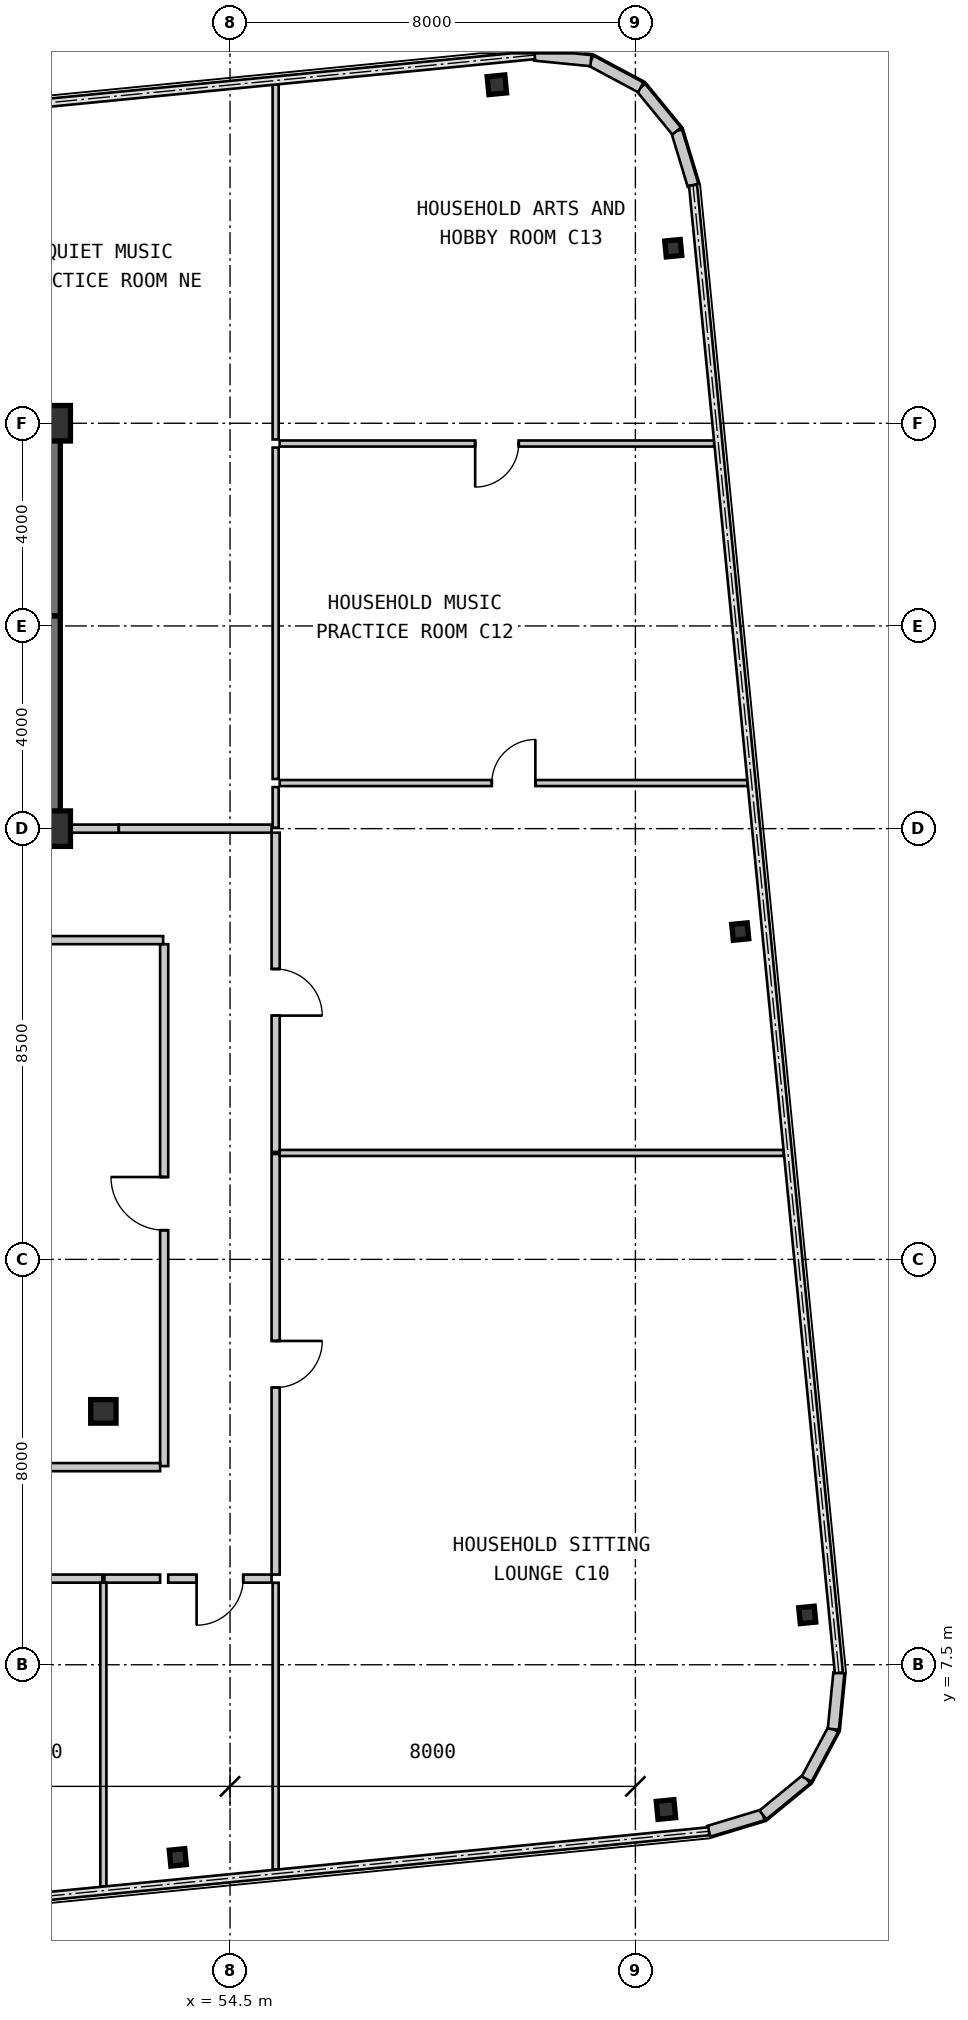
"""IFC4 building model, lengths in metres.
Left out: names, types, materials, properties, quantities, classifications, styles, units other than length and angle.
Written with IfcOpenShell. Run it as: python <this file> out.ifc"""

import sys

from ifc_helpers import new_model, si_unit, direction, frame, frame_2d, origin, origin_2d, place, context, subcontext, project, spatial, rectangle, i_section, extrude, source, transform, mapped, element, fill, save


model = new_model("IFC4")
c1 = context("Model", 3, precision=1e-05, world=origin(), true_north=direction((0.0, 1.0)))
c2 = subcontext(c1, "Body", "Model", "MODEL_VIEW")
j1 = project(units=[si_unit("LENGTHUNIT", "METRE"), si_unit("PLANEANGLEUNIT", "RADIAN")], contexts=[c1])
p1 = place(None, origin())
s1 = spatial("IfcSite", under=j1, at=p1, CompositionType="ELEMENT")
p2 = place(p1, origin())
s2 = spatial("IfcBuilding", under=s1, at=p2, CompositionType="ELEMENT")
p3 = place(p2, frame((0.0, 0.0, 93.45)))
s3 = spatial("IfcBuildingStorey", under=s2, at=p3, CompositionType="ELEMENT", Elevation=93.45)
m1 = source(origin(), c2, "Body", "SweptSolid", [
    extrude(rectangle(XDim=0.7, YDim=0.7, at=origin_2d()), origin(), (0.0, 0.0, 1.0), 3.15),
])
for number, where, z_axis, x_axis in (
    (1, (51.0, 24.0, 0.0), (0.0, 0.0, 1.0), (1.0, 0.0, 0.0)),
    (2, (51.0, 32.0, 0.0), (0.0, 0.0, 1.0), (1.0, 0.0, 0.0)),
):
    element("IfcColumn", number, at=place(p3, frame(where, z_axis=z_axis, x_axis=x_axis)), inside=s3, PredefinedType="COLUMN", context=c2, shape_type="MappedRepresentation", body=[
        mapped(m1, transform((0.0, 0.0, 0.0), scale=1.0)),
    ])
m2 = source(origin(), c2, "Body", "SweptSolid", [
    extrude(i_section(OverallWidth=0.5, OverallDepth=0.464, WebThickness=0.022, FlangeThickness=0.034, at=origin_2d()), origin(), (0.0, 0.0, 1.0), 3.15),
])
p4 = place(p3, frame((52.0, 12.5, 0.0), z_axis=(0.0, 0.0, 1.0), x_axis=(1.0, 0.0, 0.0)))
e3 = element("IfcColumn", 3, at=p4, inside=s3, PredefinedType="COLUMN", context=c2, shape_type="MappedRepresentation", body=[
    mapped(m2, transform((0.0, 0.0, 0.0), scale=1.0)),
])
m3 = source(origin(), c2, "Body", "SweptSolid", [
    extrude(i_section(OverallWidth=0.307, OverallDepth=0.315, WebThickness=0.012, FlangeThickness=0.019, at=origin_2d()), origin(), (0.0, 0.0, 1.0), 3.15),
])
p5 = place(p3, frame((53.469, 3.698, 0.0), z_axis=(0.0, 0.0, 1.0), x_axis=(0.995227399982, 0.097582899759, 0.0)))
e4 = element("IfcColumn", 4, at=p5, inside=s3, PredefinedType="COLUMN", context=c2, shape_type="MappedRepresentation", body=[
    mapped(m3, transform((0.0, 0.0, 0.0), scale=1.0)),
])
m4 = source(origin(), c2, "Body", "SweptSolid", [
    extrude(i_section(OverallWidth=0.35, OverallDepth=0.356, WebThickness=0.018, FlangeThickness=0.028, at=origin_2d()), origin(), (0.0, 0.0, 1.0), 3.15),
])
for number, where, z_axis, x_axis in (
    (5, (63.103, 4.643, 0.0), (0.0, 0.0, 1.0), (0.995, 0.098, 0.0)),
    (6, (59.766, 38.68, 0.0), (0.0, 0.0, 1.0), (0.995, 0.098, 0.0)),
):
    element("IfcColumn", number, at=place(p3, frame(where, z_axis=z_axis, x_axis=x_axis)), inside=s3, PredefinedType="COLUMN", context=c2, shape_type="MappedRepresentation", body=[
        mapped(m4, transform((0.0, 0.0, 0.0), scale=1.0)),
    ])
for number, where, z_axis, x_axis in (
    (7, (65.892, 8.484, 0.0), (0.0, 0.0, 1.0), (0.995, 0.098, 0.0)),
    (8, (64.57, 21.969, 0.0), (0.0, 0.0, 1.0), (0.995, 0.098, 0.0)),
    (9, (63.247, 35.454, 0.0), (0.0, 0.0, 1.0), (0.995, 0.098, 0.0)),
):
    element("IfcColumn", number, at=place(p3, frame(where, z_axis=z_axis, x_axis=x_axis)), inside=s3, PredefinedType="COLUMN", context=c2, shape_type="MappedRepresentation", body=[
        mapped(m3, transform((0.0, 0.0, 0.0), scale=1.0)),
    ])
m5 = source(origin(), c2, "Body", "SweptSolid", [
    extrude(rectangle(XDim=1.116, YDim=0.22, at=frame_2d((0.558, 0.0))), origin(), (0.0, 0.0, 1.0), 2.93),
])
p6 = place(p3, frame((63.949, 4.214, 0.0), z_axis=(0.0, 0.0, 1.0), x_axis=(0.957052003726, 0.289916301997, 0.0)))
e10 = element("IfcWall", 10, at=p6, inside=s3, PredefinedType="SOLIDWALL", context=c2, shape_type="MappedRepresentation", body=[
    mapped(m5, transform((0.0, 0.0, 0.0), scale=1.0)),
])
m6 = source(origin(), c2, "Body", "SweptSolid", [
    extrude(rectangle(XDim=1.116, YDim=0.22, at=frame_2d((0.558, 0.0))), origin(), (0.0, 0.0, 1.0), 2.93),
])
p7 = place(p3, frame((65.017, 4.537, 0.0), z_axis=(0.0, 0.0, 1.0), x_axis=(0.773342870285, 0.633988016432, 0.0)))
e11 = element("IfcWall", 11, at=p7, inside=s3, PredefinedType="SOLIDWALL", context=c2, shape_type="MappedRepresentation", body=[
    mapped(m6, transform((0.0, 0.0, 0.0), scale=1.0)),
])
p8 = place(p3, frame((65.88, 5.245, 0.0), z_axis=(0.0, 0.0, 1.0), x_axis=(0.471723463201, 0.881746547635, 0.0)))
e12 = element("IfcWall", 12, at=p8, inside=s3, PredefinedType="SOLIDWALL", context=c2, shape_type="MappedRepresentation", body=[
    mapped(m5, transform((0.0, 0.0, 0.0), scale=1.0)),
])
for number, where, z_axis, x_axis in (
    (13, (66.406, 6.229, 0.0), (0.0, 0.0, 1.0), (0.098, 0.995, 0.0)),
    (14, (63.638, 36.698, 0.0), (0.0, 0.0, 1.0), (-0.29, 0.957, 0.0)),
):
    element("IfcWall", number, at=place(p3, frame(where, z_axis=z_axis, x_axis=x_axis)), inside=s3, PredefinedType="SOLIDWALL", context=c2, shape_type="MappedRepresentation", body=[
        mapped(m6, transform((0.0, 0.0, 0.0), scale=1.0)),
    ])
p9 = place(p3, frame((63.314, 37.766, 0.0), z_axis=(0.0, 0.0, 1.0), x_axis=(-0.634095287989, 0.773254916409, 0.0)))
e15 = element("IfcWall", 15, at=p9, inside=s3, PredefinedType="SOLIDWALL", context=c2, shape_type="MappedRepresentation", body=[
    mapped(m5, transform((0.0, 0.0, 0.0), scale=1.0)),
])
for number, where, z_axis, x_axis in (
    (16, (62.607, 38.629, 0.0), (0.0, 0.0, 1.0), (-0.882, 0.472, 0.0)),
    (17, (61.623, 39.156, 0.0), (0.0, 0.0, 1.0), (-0.995, 0.098, 0.0)),
):
    element("IfcWall", number, at=place(p3, frame(where, z_axis=z_axis, x_axis=x_axis)), inside=s3, PredefinedType="SOLIDWALL", context=c2, shape_type="MappedRepresentation", body=[
        mapped(m6, transform((0.0, 0.0, 0.0), scale=1.0)),
    ])
m7 = source(origin(), c2, "Body", "SweptSolid", [
    extrude(rectangle(XDim=11.95, YDim=0.3, at=frame_2d((5.975, 0.0))), origin(), (0.0, 0.0, 1.0), 2.93),
])
p10 = place(p3, frame((39.2, 32.0, 0.0), z_axis=(0.0, 0.0, 1.0), x_axis=(1.0, 0.0, 0.0)))
e18 = element("IfcWall", 18, at=p10, inside=s3, PredefinedType="SHEAR", context=c2, shape_type="MappedRepresentation", body=[
    mapped(m7, transform((0.0, 0.0, 0.0), scale=1.0)),
])
m8 = source(origin(), c2, "Body", "SweptSolid", [
    extrude(rectangle(XDim=4.05, YDim=0.3, at=frame_2d((2.025, 0.0))), origin(), (0.0, 0.0, 1.0), 2.93),
])
p11 = place(p3, frame((51.0, 24.15, 0.0), z_axis=(0.0, 0.0, 1.0), x_axis=(0.0, 1.0, 0.0)))
e19 = element("IfcWall", 19, at=p11, inside=s3, PredefinedType="SHEAR", context=c2, shape_type="MappedRepresentation", body=[
    mapped(m8, transform((0.0, 0.0, 0.0), scale=1.0)),
])
m9 = source(origin(), c2, "Body", "SweptSolid", [
    extrude(rectangle(XDim=3.65, YDim=0.3, at=frame_2d((1.825, 0.0))), origin(), (0.0, 0.0, 1.0), 2.93),
])
p12 = place(p3, frame((51.0, 28.2, 0.0), z_axis=(0.0, 0.0, 1.0), x_axis=(0.0, 1.0, 0.0)))
e20 = element("IfcWall", 20, at=p12, inside=s3, PredefinedType="SHEAR", context=c2, shape_type="MappedRepresentation", body=[
    mapped(m9, transform((0.0, 0.0, 0.0), scale=1.0)),
])
m10 = source(origin(), c2, "Body", "SweptSolid", [
    extrude(rectangle(XDim=4.9, YDim=0.3, at=frame_2d((2.45, 0.0))), origin(), (0.0, 0.0, 1.0), 2.93),
])
p13 = place(p3, frame((46.25, 24.0, 0.0), z_axis=(0.0, 0.0, 1.0), x_axis=(1.0, 0.0, 0.0)))
e21 = element("IfcWall", 21, at=p13, inside=s3, PredefinedType="SHEAR", context=c2, shape_type="MappedRepresentation", body=[
    mapped(m10, transform((0.0, 0.0, 0.0), scale=1.0)),
])
m11 = source(origin(), c2, "Body", "SweptSolid", [
    extrude(rectangle(XDim=10.3, YDim=0.16, at=frame_2d((5.15, 0.0))), origin(), (0.0, 0.0, 1.0), 2.93),
])
p14 = place(p3, frame((53.2, 11.42, 0.0), z_axis=(0.0, 0.0, 1.0), x_axis=(0.0, 1.0, 0.0)))
e22 = element("IfcWall", 22, at=p14, inside=s3, PredefinedType="PARTITIONING", context=c2, shape_type="MappedRepresentation", body=[
    mapped(m11, transform((0.0, 0.0, 0.0), scale=1.0)),
])
m12 = source(origin(), c2, "Body", "SweptSolid", [
    extrude(rectangle(XDim=1.05, YDim=2.1, at=frame_2d((0.525, 1.05))), frame((0.0, 0.09, 0.0), z_axis=(0.0, -1.0, 0.0), x_axis=(1.0, 0.0, 0.0)), (0.0, 0.0, 1.0), 0.18),
])
p15 = place(p14, frame((4.655, 0.0, 0.0)))
e23 = element("IfcOpeningElement", 23, at=p15, cuts=e22, PredefinedType="OPENING", context=c2, shape_type="MappedRepresentation", body=[
    mapped(m12, transform((0.0, 0.0, 0.0), scale=1.0)),
])
m13 = source(origin(), c2, "Body", "SweptSolid", [
    extrude(rectangle(XDim=7.359, YDim=0.16, at=frame_2d((3.68, 0.0))), origin(), (0.0, 0.0, 1.0), 2.93),
])
p16 = place(p3, frame((53.18, 21.8, 0.0), z_axis=(0.0, 0.0, 1.0), x_axis=(-1.0, 0.0, 0.0)))
e24 = element("IfcWall", 24, at=p16, inside=s3, PredefinedType="PARTITIONING", context=c2, shape_type="MappedRepresentation", body=[
    mapped(m13, transform((0.0, 0.0, 0.0), scale=1.0)),
])
m14 = source(origin(), c2, "Body", "SweptSolid", [
    extrude(rectangle(XDim=2.04, YDim=0.16, at=frame_2d((1.02, 0.0))), origin(), (0.0, 0.0, 1.0), 2.93),
])
p17 = place(p3, frame((55.32, 9.2, 0.0), z_axis=(0.0, 0.0, 1.0), x_axis=(-1.0, 0.0, 0.0)))
e25 = element("IfcWall", 25, at=p17, inside=s3, PredefinedType="PARTITIONING", context=c2, shape_type="MappedRepresentation", body=[
    mapped(m14, transform((0.0, 0.0, 0.0), scale=1.0)),
])
m15 = source(origin(), c2, "Body", "SweptSolid", [
    extrude(rectangle(XDim=0.92, YDim=2.1, at=frame_2d((0.46, 1.05))), frame((0.0, 0.09, 0.0), z_axis=(0.0, -1.0, 0.0), x_axis=(1.0, 0.0, 0.0)), (0.0, 0.0, 1.0), 0.18),
])
p18 = place(p17, frame((0.56, 0.0, 0.0)))
e26 = element("IfcOpeningElement", 26, at=p18, cuts=e25, PredefinedType="OPENING", context=c2, shape_type="MappedRepresentation", body=[
    mapped(m15, transform((0.0, 0.0, 0.0), scale=1.0)),
])
m16 = source(origin(), c2, "Body", "SweptSolid", [
    extrude(rectangle(XDim=8.3, YDim=0.16, at=frame_2d((4.15, 0.0))), origin(), (0.0, 0.0, 1.0), 2.93),
])
p19 = place(p3, frame((55.4, 17.58, 0.0), z_axis=(0.0, 0.0, 1.0), x_axis=(0.0, -1.0, 0.0)))
e27 = element("IfcWall", 27, at=p19, inside=s3, PredefinedType="PARTITIONING", context=c2, shape_type="MappedRepresentation", body=[
    mapped(m16, transform((0.0, 0.0, 0.0), scale=1.0)),
])
p20 = place(p19, frame((3.69, 0.0, 0.0)))
e28 = element("IfcOpeningElement", 28, at=p20, cuts=e27, PredefinedType="OPENING", context=c2, shape_type="MappedRepresentation", body=[
    mapped(m15, transform((0.0, 0.0, 0.0), scale=1.0)),
])
m17 = source(origin(), c2, "Body", "SweptSolid", [
    extrude(rectangle(XDim=6.3, YDim=0.16, at=frame_2d((3.15, 0.0))), origin(), (0.0, 0.0, 1.0), 2.93),
])
p21 = place(p3, frame((55.4, 23.92, 0.0), z_axis=(0.0, 0.0, 1.0), x_axis=(0.0, -1.0, 0.0)))
e29 = element("IfcWall", 29, at=p21, inside=s3, PredefinedType="PARTITIONING", context=c2, shape_type="MappedRepresentation", body=[
    mapped(m17, transform((0.0, 0.0, 0.0), scale=1.0)),
])
p22 = place(p21, frame((2.69, 0.0, 0.0)))
e30 = element("IfcOpeningElement", 30, at=p22, cuts=e29, PredefinedType="OPENING", context=c2, shape_type="MappedRepresentation", body=[
    mapped(m15, transform((0.0, 0.0, 0.0), scale=1.0)),
])
m18 = source(origin(), c2, "Body", "SweptSolid", [
    extrude(rectangle(XDim=1.155, YDim=0.16, at=frame_2d((0.577, 0.0))), origin(), (0.0, 0.0, 1.0), 2.328),
])
p23 = place(p3, frame((51.15, 24.0, 0.0), z_axis=(0.0, 0.0, 1.0), x_axis=(1.0, 0.0, 0.0)))
e31 = element("IfcWall", 31, at=p23, inside=s3, PredefinedType="PARTITIONING", context=c2, shape_type="MappedRepresentation", body=[
    mapped(m18, transform((0.0, 0.0, 0.0), scale=1.0)),
])
m19 = source(origin(), c2, "Body", "SweptSolid", [
    extrude(rectangle(XDim=3.016, YDim=0.16, at=frame_2d((1.508, 0.0))), origin(), (0.0, 0.0, 1.0), 2.93),
])
p24 = place(p3, frame((52.304, 24.0, 0.0), z_axis=(0.0, 0.0, 1.0), x_axis=(1.0, 0.0, 0.0)))
e32 = element("IfcWall", 32, at=p24, inside=s3, PredefinedType="PARTITIONING", context=c2, shape_type="MappedRepresentation", body=[
    mapped(m19, transform((0.0, 0.0, 0.0), scale=1.0)),
])
m20 = source(origin(), c2, "Body", "SweptSolid", [
    extrude(rectangle(XDim=7.3, YDim=0.16, at=frame_2d((3.65, 0.0))), origin(), (0.0, 0.0, 1.0), 2.93),
])
p25 = place(p3, frame((45.82, 11.4, 0.0), z_axis=(0.0, 0.0, 1.0), x_axis=(1.0, 0.0, 0.0)))
e33 = element("IfcWall", 33, at=p25, inside=s3, PredefinedType="PARTITIONING", context=c2, shape_type="MappedRepresentation", body=[
    mapped(m20, transform((0.0, 0.0, 0.0), scale=1.0)),
])
m21 = source(origin(), c2, "Body", "SweptSolid", [
    extrude(rectangle(XDim=9.959, YDim=0.16, at=frame_2d((4.98, 0.0))), origin(), (0.0, 0.0, 1.0), 2.93),
])
p26 = place(p3, frame((51.98, 9.2, 0.0), z_axis=(0.0, 0.0, 1.0), x_axis=(-1.0, 0.0, 0.0)))
e34 = element("IfcWall", 34, at=p26, inside=s3, PredefinedType="PARTITIONING", context=c2, shape_type="MappedRepresentation", body=[
    mapped(m21, transform((0.0, 0.0, 0.0), scale=1.0)),
])
p27 = place(p26, frame((4.52, 0.0, 0.0)))
e35 = element("IfcOpeningElement", 35, at=p27, cuts=e34, PredefinedType="OPENING", context=c2, shape_type="MappedRepresentation", body=[
    mapped(m15, transform((0.0, 0.0, 0.0), scale=1.0)),
])
m22 = source(origin(), c2, "Body", "SweptSolid", [
    extrude(rectangle(XDim=1.1, YDim=0.16, at=frame_2d((0.55, 0.0))), origin(), (0.0, 0.0, 1.0), 2.93),
])
p28 = place(p3, frame((53.12, 9.2, 0.0), z_axis=(0.0, 0.0, 1.0), x_axis=(-1.0, 0.0, 0.0)))
e36 = element("IfcWall", 36, at=p28, inside=s3, PredefinedType="PARTITIONING", context=c2, shape_type="MappedRepresentation", body=[
    mapped(m22, transform((0.0, 0.0, 0.0), scale=1.0)),
])
m23 = source(origin(), c2, "Body", "SweptSolid", [
    extrude(rectangle(XDim=5.996, YDim=0.12, at=frame_2d((2.998, 0.0))), origin(), (0.0, 0.0, 1.0), 2.93),
])
p29 = place(p3, frame((52.0, 9.12, 0.0), z_axis=(0.0, 0.0, 1.0), x_axis=(0.0, -1.0, 0.0)))
e37 = element("IfcWall", 37, at=p29, inside=s3, PredefinedType="PARTITIONING", context=c2, shape_type="MappedRepresentation", body=[
    mapped(m23, transform((0.0, 0.0, 0.0), scale=1.0)),
])
m24 = source(origin(), c2, "Body", "SweptSolid", [
    extrude(rectangle(XDim=5.658, YDim=0.12, at=frame_2d((2.829, 0.0))), origin(), (0.0, 0.0, 1.0), 2.93),
])
p30 = place(p3, frame((55.4, 9.118, 0.0), z_axis=(0.0, 0.0, 1.0), x_axis=(0.0, -1.0, 0.0)))
e38 = element("IfcWall", 38, at=p30, inside=s3, PredefinedType="PARTITIONING", context=c2, shape_type="MappedRepresentation", body=[
    mapped(m24, transform((0.0, 0.0, 0.0), scale=1.0)),
])
m25 = source(origin(), c2, "Body", "SweptSolid", [
    extrude(rectangle(XDim=9.948, YDim=0.12, at=frame_2d((4.974, 0.0))), origin(), (0.0, 0.0, 1.0), 2.93),
])
p31 = place(p3, frame((55.48, 17.6, 0.0), z_axis=(0.0, 0.0, 1.0), x_axis=(1.0, 0.0, 0.0)))
e39 = element("IfcWall", 39, at=p31, inside=s3, PredefinedType="PARTITIONING", context=c2, shape_type="MappedRepresentation", body=[
    mapped(m25, transform((0.0, 0.0, 0.0), scale=1.0)),
])
m26 = source(origin(), c2, "Body", "SweptSolid", [
    extrude(rectangle(XDim=9.232, YDim=0.12, at=frame_2d((4.616, 0.0))), origin(), (0.0, 0.0, 1.0), 2.93),
])
p32 = place(p3, frame((55.48, 24.9, 0.0), z_axis=(0.0, 0.0, 1.0), x_axis=(1.0, 0.0, 0.0)))
e40 = element("IfcWall", 40, at=p32, inside=s3, PredefinedType="PARTITIONING", context=c2, shape_type="MappedRepresentation", body=[
    mapped(m26, transform((0.0, 0.0, 0.0), scale=1.0)),
])
m27 = source(origin(), c2, "Body", "SweptSolid", [
    extrude(rectangle(XDim=0.86, YDim=2.1, at=frame_2d((0.43, 1.05))), frame((0.0, 0.07, 0.0), z_axis=(0.0, -1.0, 0.0), x_axis=(1.0, 0.0, 0.0)), (0.0, 0.0, 1.0), 0.14),
])
p33 = place(p32, frame((4.186, 0.0, 0.0)))
e41 = element("IfcOpeningElement", 41, at=p33, cuts=e40, PredefinedType="OPENING", context=c2, shape_type="MappedRepresentation", body=[
    mapped(m27, transform((0.0, 0.0, 0.0), scale=1.0)),
])
m28 = source(origin(), c2, "Body", "SweptSolid", [
    extrude(rectangle(XDim=0.8, YDim=0.12, at=frame_2d((0.4, 0.0))), origin(), (0.0, 0.0, 1.0), 2.93),
])
p34 = place(p3, frame((55.4, 24.02, 0.0), z_axis=(0.0, 0.0, 1.0), x_axis=(0.0, 1.0, 0.0)))
e42 = element("IfcWall", 42, at=p34, inside=s3, PredefinedType="PARTITIONING", context=c2, shape_type="MappedRepresentation", body=[
    mapped(m28, transform((0.0, 0.0, 0.0), scale=1.0)),
])
m29 = source(origin(), c2, "Body", "SweptSolid", [
    extrude(rectangle(XDim=8.575, YDim=0.12, at=frame_2d((4.288, 0.0))), origin(), (0.0, 0.0, 1.0), 2.93),
])
p35 = place(p3, frame((55.48, 31.6, 0.0), z_axis=(0.0, 0.0, 1.0), x_axis=(1.0, 0.0, 0.0)))
e43 = element("IfcWall", 43, at=p35, inside=s3, PredefinedType="PARTITIONING", context=c2, shape_type="MappedRepresentation", body=[
    mapped(m29, transform((0.0, 0.0, 0.0), scale=1.0)),
])
p36 = place(p35, frame((3.857, 0.0, 0.0)))
e44 = element("IfcOpeningElement", 44, at=p36, cuts=e43, PredefinedType="OPENING", context=c2, shape_type="MappedRepresentation", body=[
    mapped(m27, transform((0.0, 0.0, 0.0), scale=1.0)),
])
m30 = source(origin(), c2, "Body", "SweptSolid", [
    extrude(rectangle(XDim=6.54, YDim=0.12, at=frame_2d((3.27, 0.0))), origin(), (0.0, 0.0, 1.0), 2.93),
])
p37 = place(p3, frame((55.4, 24.98, 0.0), z_axis=(0.0, 0.0, 1.0), x_axis=(0.0, 1.0, 0.0)))
e45 = element("IfcWall", 45, at=p37, inside=s3, PredefinedType="PARTITIONING", context=c2, shape_type="MappedRepresentation", body=[
    mapped(m30, transform((0.0, 0.0, 0.0), scale=1.0)),
])
m31 = source(origin(), c2, "Body", "SweptSolid", [
    extrude(rectangle(XDim=7.002, YDim=0.12, at=frame_2d((3.501, 0.0))), origin(), (0.0, 0.0, 1.0), 2.93),
])
p38 = place(p3, frame((55.4, 31.68, 0.0), z_axis=(0.0, 0.0, 1.0), x_axis=(0.0, 1.0, 0.0)))
e46 = element("IfcWall", 46, at=p38, inside=s3, PredefinedType="PARTITIONING", context=c2, shape_type="MappedRepresentation", body=[
    mapped(m31, transform((0.0, 0.0, 0.0), scale=1.0)),
])
m32 = source(origin(), c2, "Body", "SweptSolid", [
    extrude(rectangle(XDim=1.05, YDim=2.1, at=frame_2d((0.525, 1.05))), frame((0.0, 0.025, 0.0), z_axis=(0.0, -1.0, 0.0), x_axis=(1.0, 0.0, 0.0)), (0.0, 0.0, 1.0), 0.05),
])
p39 = place(p15, origin())
e47 = element("IfcDoor", 47, at=p39, inside=s3, OperationType="SINGLE_SWING_RIGHT", PredefinedType="DOOR", context=c2, shape_type="MappedRepresentation", body=[
    mapped(m32, transform((0.0, 0.0, 0.0), scale=1.0)),
])
fill(e23, e47)
m33 = source(origin(), c2, "Body", "SweptSolid", [
    extrude(rectangle(XDim=0.92, YDim=2.1, at=frame_2d((0.46, 1.05))), frame((0.0, 0.025, 0.0), z_axis=(0.0, -1.0, 0.0), x_axis=(1.0, 0.0, 0.0)), (0.0, 0.0, 1.0), 0.05),
])
p40 = place(p18, origin())
e48 = element("IfcDoor", 48, at=p40, inside=s3, OperationType="SINGLE_SWING_RIGHT", PredefinedType="DOOR", context=c2, shape_type="MappedRepresentation", body=[
    mapped(m33, transform((0.0, 0.0, 0.0), scale=1.0)),
])
fill(e26, e48)
p41 = place(p20, origin())
e49 = element("IfcDoor", 49, at=p41, inside=s3, OperationType="SINGLE_SWING_LEFT", PredefinedType="DOOR", context=c2, shape_type="MappedRepresentation", body=[
    mapped(m33, transform((0.0, 0.0, 0.0), scale=1.0)),
])
fill(e28, e49)
p42 = place(p22, origin())
e50 = element("IfcDoor", 50, at=p42, inside=s3, OperationType="SINGLE_SWING_RIGHT", PredefinedType="DOOR", context=c2, shape_type="MappedRepresentation", body=[
    mapped(m33, transform((0.0, 0.0, 0.0), scale=1.0)),
])
fill(e30, e50)
m34 = source(origin(), c2, "Body", "SweptSolid", [
    extrude(rectangle(XDim=0.86, YDim=2.1, at=frame_2d((0.43, 1.05))), frame((0.0, 0.025, 0.0), z_axis=(0.0, -1.0, 0.0), x_axis=(1.0, 0.0, 0.0)), (0.0, 0.0, 1.0), 0.05),
])
p43 = place(p33, origin())
e51 = element("IfcDoor", 51, at=p43, inside=s3, OperationType="SINGLE_SWING_RIGHT", PredefinedType="DOOR", context=c2, shape_type="MappedRepresentation", body=[
    mapped(m34, transform((0.0, 0.0, 0.0), scale=1.0)),
])
fill(e41, e51)
p44 = place(p36, frame((0.86, 0.0, 0.0), z_axis=(0.0, 0.0, 1.0), x_axis=(-1.0, 0.0, 0.0)))
e52 = element("IfcDoor", 52, at=p44, inside=s3, OperationType="SINGLE_SWING_RIGHT", PredefinedType="DOOR", context=c2, shape_type="MappedRepresentation", body=[
    mapped(m34, transform((0.0, 0.0, 0.0), scale=1.0)),
])
fill(e44, e52)
save(model, sys.argv[1])
